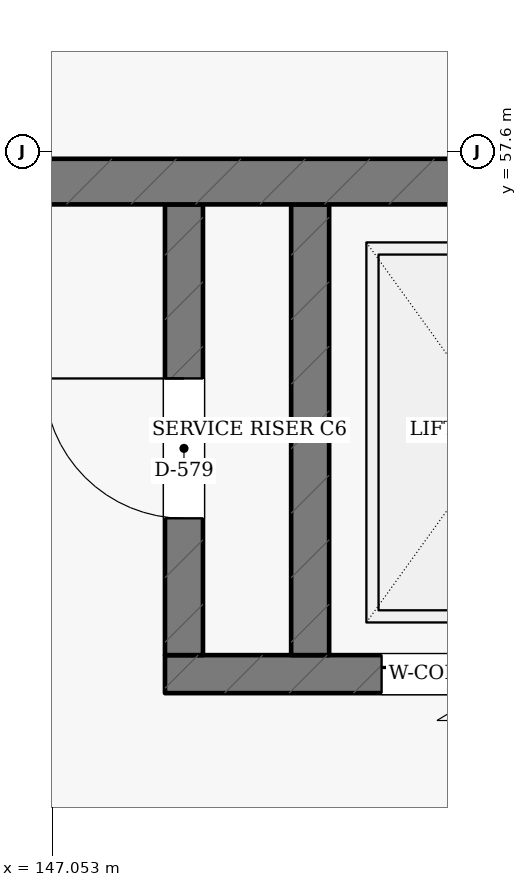
"""IFC4 building model, lengths in metres.
Left out: names, types, materials, properties, quantities, classifications, styles, units other than length and angle.
Written with IfcOpenShell. Run it as: python <this file> out.ifc"""

import sys

from ifc_helpers import new_model, si_unit, direction, frame, frame_2d, origin, place, context, subcontext, project, spatial, rectangle, extrude, element, fill, save


model = new_model("IFC4")
c1 = context("Model", 3, precision=1e-05, world=origin(), true_north=direction((0.0, 1.0)))
c2 = subcontext(c1, "Body", "Model", "MODEL_VIEW")
j1 = project(units=[si_unit("LENGTHUNIT", "METRE"), si_unit("PLANEANGLEUNIT", "RADIAN")], contexts=[c1])
p1 = place(None, origin())
s1 = spatial("IfcSite", under=j1, at=p1, CompositionType="ELEMENT")
p2 = place(p1, origin())
s2 = spatial("IfcBuilding", under=s1, at=p2, CompositionType="ELEMENT")
p3 = place(p2, origin())
s3 = spatial("IfcBuildingStorey", under=s2, at=p3, CompositionType="ELEMENT", Elevation=0.0)
p4 = place(p3, frame((147.795, 54.16, 0.0), z_axis=(0.0, 0.0, 1.0), x_axis=(1.0, 0.0, 0.0)))
e1 = element("IfcWall", 1, at=p4, inside=s3, PredefinedType="SHEAR", context=c2, shape_type="SweptSolid", body=[
    extrude(rectangle(XDim=3.58, YDim=0.25, at=frame_2d((1.79, 0.0))), origin(), (0.0, 0.0, 1.0), 4.45),
])
p5 = place(p4, frame((1.425, 0.0, 0.0)))
e2 = element("IfcOpeningElement", 2, at=p5, cuts=e1, PredefinedType="OPENING", context=c2, shape_type="SweptSolid", body=[
    extrude(rectangle(XDim=1.3, YDim=2.2, at=frame_2d((0.65, 1.1))), frame((0.0, 0.135, 0.0), z_axis=(0.0, -1.0, 0.0), x_axis=(1.0, 0.0, 0.0)), (0.0, 0.0, 1.0), 0.27),
])
p6 = place(p3, frame((148.75, 54.285, 0.0), z_axis=(0.0, 0.0, 1.0), x_axis=(0.0, 1.0, 0.0)))
e3 = element("IfcWall", 3, at=p6, inside=s3, PredefinedType="SHEAR", context=c2, shape_type="SweptSolid", body=[
    extrude(rectangle(XDim=2.965, YDim=0.25, at=frame_2d((1.482, 0.0))), origin(), (0.0, 0.0, 1.0), 4.45),
])
p7 = place(p3, frame((147.92, 54.285, 0.0), z_axis=(0.0, 0.0, 1.0), x_axis=(0.0, 1.0, 0.0)))
e4 = element("IfcWall", 4, at=p7, inside=s3, PredefinedType="SHEAR", context=c2, shape_type="SweptSolid", body=[
    extrude(rectangle(XDim=2.965, YDim=0.25, at=frame_2d((1.482, 0.0))), origin(), (0.0, 0.0, 1.0), 4.45),
])
p8 = place(p7, frame((0.9, 0.0, 0.0)))
e5 = element("IfcOpeningElement", 5, at=p8, cuts=e4, PredefinedType="OPENING", context=c2, shape_type="SweptSolid", body=[
    extrude(rectangle(XDim=0.92, YDim=2.05, at=frame_2d((0.46, 1.025))), frame((0.0, 0.135, 0.0), z_axis=(0.0, -1.0, 0.0), x_axis=(1.0, 0.0, 0.0)), (0.0, 0.0, 1.0), 0.27),
])
p9 = place(p3, frame((144.0, 57.4, 0.0), z_axis=(0.0, 0.0, 1.0), x_axis=(1.0, 0.0, 0.0)))
e6 = element("IfcWall", 6, at=p9, inside=s3, PredefinedType="SHEAR", context=c2, shape_type="SweptSolid", body=[
    extrude(rectangle(XDim=14.23, YDim=0.3, at=frame_2d((7.115, 0.0))), origin(), (0.0, 0.0, 1.0), 4.45),
])
p10 = place(p5, origin())
e7 = element("IfcDoor", 7, at=p10, inside=s3, OperationType="SLIDING_TO_LEFT", PredefinedType="DOOR", context=c2, shape_type="SweptSolid", body=[
    extrude(rectangle(XDim=1.3, YDim=2.2, at=frame_2d((0.65, 1.1))), frame((0.0, 0.025, 0.0), z_axis=(0.0, -1.0, 0.0), x_axis=(1.0, 0.0, 0.0)), (0.0, 0.0, 1.0), 0.05),
])
fill(e2, e7)
p11 = place(p8, origin())
e8 = element("IfcDoor", 8, at=p11, inside=s3, OperationType="SINGLE_SWING_RIGHT", PredefinedType="DOOR", context=c2, shape_type="SweptSolid", body=[
    extrude(rectangle(XDim=0.92, YDim=2.05, at=frame_2d((0.46, 1.025))), frame((0.0, 0.025, 0.0), z_axis=(0.0, -1.0, 0.0), x_axis=(1.0, 0.0, 0.0)), (0.0, 0.0, 1.0), 0.05),
])
fill(e5, e8)
save(model, sys.argv[1])
